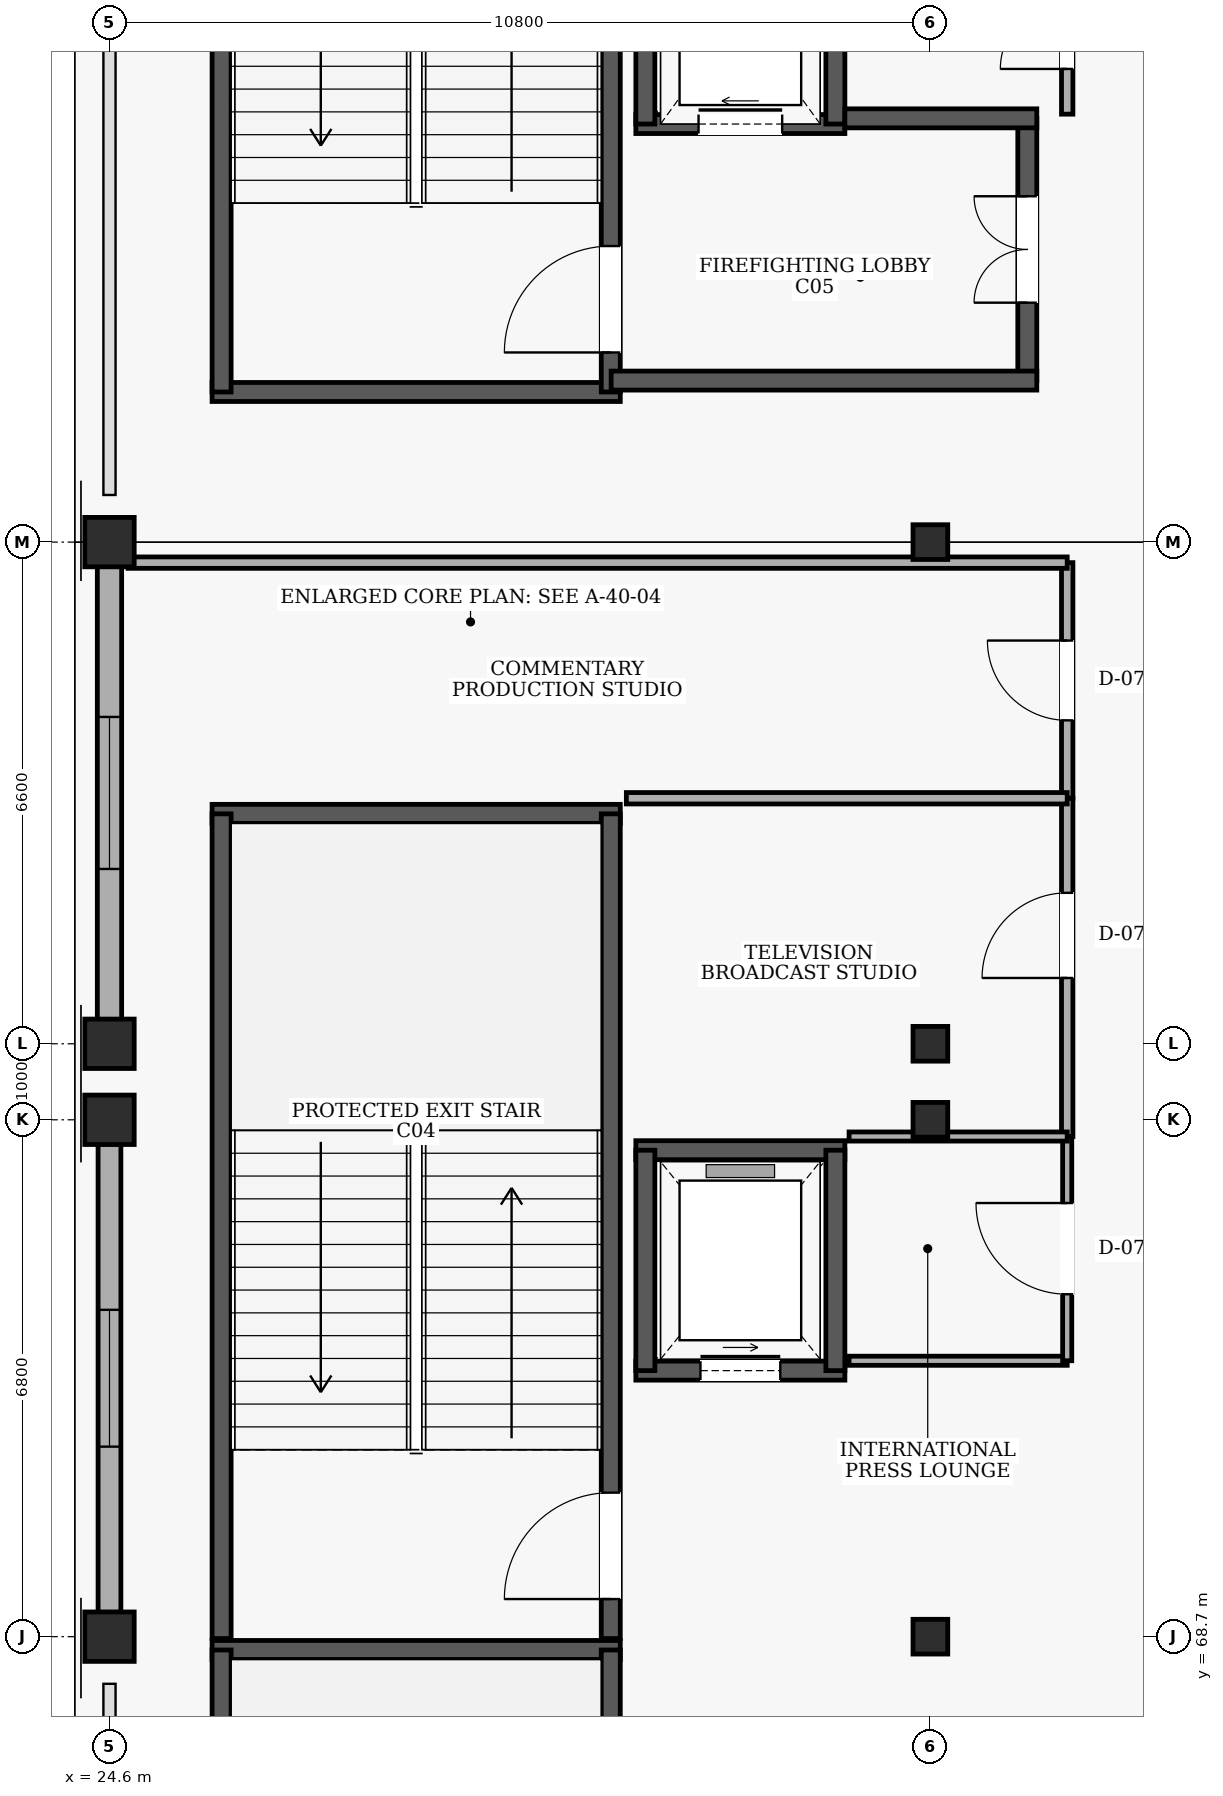
"""IFC4 building model, lengths in metres.
Left out: names, types, materials, properties, quantities, classifications, styles, units other than length and angle.
Written with IfcOpenShell. Run it as: python <this file> out.ifc"""

import sys

from ifc_helpers import new_model, si_unit, direction, frame, frame_2d, origin, origin_2d, place, context, subcontext, project, spatial, rectangle, hollow_circle, extrude, element, fill, save


model = new_model("IFC4")
c1 = context("Model", 3, precision=1e-05, world=origin(), true_north=direction((0.0, 1.0)))
c2 = subcontext(c1, "Body", "Model", "MODEL_VIEW")
j1 = project(units=[si_unit("LENGTHUNIT", "METRE"), si_unit("PLANEANGLEUNIT", "RADIAN")], contexts=[c1])
p1 = place(None, origin())
s1 = spatial("IfcSite", under=j1, at=p1, CompositionType="ELEMENT")
p2 = place(p1, origin())
s2 = spatial("IfcBuilding", under=s1, at=p2, CompositionType="ELEMENT")
p3 = place(p2, frame((0.0, 0.0, 19.8)))
s3 = spatial("IfcBuildingStorey", under=s2, at=p3, CompositionType="ELEMENT", Elevation=19.8)
for number, where, z_axis, x_axis in (
    (1, (24.6, 68.7, 0.0), (0.0, 0.0, 1.0), (1.0, 0.0, 0.0)),
    (2, (24.6, 75.5, 0.0), (0.0, 0.0, 1.0), (1.0, 0.0, 0.0)),
    (3, (24.6, 76.5, 0.0), (0.0, 0.0, 1.0), (1.0, 0.0, 0.0)),
    (4, (24.6, 83.1, 0.0), (0.0, 0.0, 1.0), (1.0, 0.0, 0.0)),
):
    element("IfcColumn", number, at=place(p3, frame(where, z_axis=z_axis, x_axis=x_axis)), inside=s3, PredefinedType="COLUMN", context=c2, shape_type="SweptSolid", body=[
        extrude(rectangle(XDim=0.65, YDim=0.65, at=origin_2d()), origin(), (0.0, 0.0, 1.0), 4.8),
    ])
for number, where, z_axis, x_axis in (
    (5, (35.4, 68.7, 0.0), (0.0, 0.0, 1.0), (1.0, 0.0, 0.0)),
    (6, (35.4, 75.5, 0.0), (0.0, 0.0, 1.0), (1.0, 0.0, 0.0)),
    (7, (35.4, 76.5, 0.0), (0.0, 0.0, 1.0), (1.0, 0.0, 0.0)),
    (8, (35.4, 83.1, 0.0), (0.0, 0.0, 1.0), (1.0, 0.0, 0.0)),
):
    element("IfcColumn", number, at=place(p3, frame(where, z_axis=z_axis, x_axis=x_axis)), inside=s3, PredefinedType="COLUMN", context=c2, shape_type="SweptSolid", body=[
        extrude(hollow_circle(Radius=0.229, WallThickness=0.02, at=origin_2d()), origin(), (0.0, 0.0, 1.0), 4.8),
    ])
p4 = place(p3, frame((24.6, 69.02, 0.0), z_axis=(0.0, 0.0, 1.0), x_axis=(0.0, 1.0, 0.0)))
e9 = element("IfcWall", 9, at=p4, inside=s3, PredefinedType="SOLIDWALL", context=c2, shape_type="SweptSolid", body=[
    extrude(rectangle(XDim=6.16, YDim=0.3, at=frame_2d((3.08, 0.0))), origin(), (0.0, 0.0, 1.0), 3.88),
])
p5 = place(p4, frame((2.18, 0.0, 0.9)))
e10 = element("IfcOpeningElement", 10, at=p5, cuts=e9, PredefinedType="OPENING", context=c2, shape_type="SweptSolid", body=[
    extrude(rectangle(XDim=1.8, YDim=1.5, at=frame_2d((0.9, 0.75))), frame((0.0, 0.16, 0.0), z_axis=(0.0, -1.0, 0.0), x_axis=(1.0, 0.0, 0.0)), (0.0, 0.0, 1.0), 0.32),
])
p6 = place(p3, frame((24.6, 76.82, 0.0), z_axis=(0.0, 0.0, 1.0), x_axis=(0.0, 1.0, 0.0)))
e11 = element("IfcWall", 11, at=p6, inside=s3, PredefinedType="SOLIDWALL", context=c2, shape_type="SweptSolid", body=[
    extrude(rectangle(XDim=5.96, YDim=0.32, at=frame_2d((2.98, 0.0))), origin(), (0.0, 0.0, 1.0), 3.98),
])
p7 = place(p6, frame((1.98, 0.0, 0.9)))
e12 = element("IfcOpeningElement", 12, at=p7, cuts=e11, PredefinedType="OPENING", context=c2, shape_type="SweptSolid", body=[
    extrude(rectangle(XDim=2.0, YDim=1.5, at=frame_2d((1.0, 0.75))), frame((0.0, 0.17, 0.0), z_axis=(0.0, -1.0, 0.0), x_axis=(1.0, 0.0, 0.0)), (0.0, 0.0, 1.0), 0.34),
])
p8 = place(p3, frame((31.32, 68.525, 0.0), z_axis=(0.0, 0.0, 1.0), x_axis=(-1.0, 0.0, 0.0)))
e13 = element("IfcWall", 13, at=p8, inside=s3, PredefinedType="SHEAR", context=c2, shape_type="SweptSolid", body=[
    extrude(rectangle(XDim=5.37, YDim=0.25, at=frame_2d((2.685, 0.0))), origin(), (0.0, 0.0, 1.0), 4.5),
])
p9 = place(p3, frame((26.075, 57.675, 0.0), z_axis=(0.0, 0.0, 1.0), x_axis=(0.0, 1.0, 0.0)))
e14 = element("IfcWall", 14, at=p9, inside=s3, PredefinedType="SHEAR", context=c2, shape_type="SweptSolid", body=[
    extrude(rectangle(XDim=10.85, YDim=0.25, at=frame_2d((5.425, 0.0))), origin(), (0.0, 0.0, 1.0), 4.5),
])
p10 = place(p3, frame((31.195, 57.675, 0.0), z_axis=(0.0, 0.0, 1.0), x_axis=(0.0, 1.0, 0.0)))
e15 = element("IfcWall", 15, at=p10, inside=s3, PredefinedType="SHEAR", context=c2, shape_type="SweptSolid", body=[
    extrude(rectangle(XDim=10.85, YDim=0.25, at=frame_2d((5.425, 0.0))), origin(), (0.0, 0.0, 1.0), 4.5),
])
p11 = place(p10, frame((0.52, 0.0, 0.0)))
e16 = element("IfcOpeningElement", 16, at=p11, cuts=e15, PredefinedType="OPENING", context=c2, shape_type="SweptSolid", body=[
    extrude(rectangle(XDim=1.4, YDim=2.15, at=frame_2d((0.7, 1.075))), frame((0.0, 0.135, 0.0), z_axis=(0.0, -1.0, 0.0), x_axis=(1.0, 0.0, 0.0)), (0.0, 0.0, 1.0), 0.27),
])
p12 = place(p3, frame((31.32, 79.525, 0.0), z_axis=(0.0, 0.0, 1.0), x_axis=(-1.0, 0.0, 0.0)))
e17 = element("IfcWall", 17, at=p12, inside=s3, PredefinedType="SHEAR", context=c2, shape_type="SweptSolid", body=[
    extrude(rectangle(XDim=5.37, YDim=0.25, at=frame_2d((2.685, 0.0))), origin(), (0.0, 0.0, 1.0), 4.5),
])
p13 = place(p3, frame((26.075, 68.675, 0.0), z_axis=(0.0, 0.0, 1.0), x_axis=(0.0, 1.0, 0.0)))
e18 = element("IfcWall", 18, at=p13, inside=s3, PredefinedType="SHEAR", context=c2, shape_type="SweptSolid", body=[
    extrude(rectangle(XDim=10.85, YDim=0.25, at=frame_2d((5.425, 0.0))), origin(), (0.0, 0.0, 1.0), 4.5),
])
p14 = place(p3, frame((31.195, 68.675, 0.0), z_axis=(0.0, 0.0, 1.0), x_axis=(0.0, 1.0, 0.0)))
e19 = element("IfcWall", 19, at=p14, inside=s3, PredefinedType="SHEAR", context=c2, shape_type="SweptSolid", body=[
    extrude(rectangle(XDim=10.85, YDim=0.25, at=frame_2d((5.425, 0.0))), origin(), (0.0, 0.0, 1.0), 4.5),
])
p15 = place(p14, frame((0.52, 0.0, 0.0)))
e20 = element("IfcOpeningElement", 20, at=p15, cuts=e19, PredefinedType="OPENING", context=c2, shape_type="SweptSolid", body=[
    extrude(rectangle(XDim=1.4, YDim=2.15, at=frame_2d((0.7, 1.075))), frame((0.0, 0.135, 0.0), z_axis=(0.0, -1.0, 0.0), x_axis=(1.0, 0.0, 0.0)), (0.0, 0.0, 1.0), 0.27),
])
p16 = place(p3, frame((25.95, 85.075, 0.0), z_axis=(0.0, 0.0, 1.0), x_axis=(1.0, 0.0, 0.0)))
e21 = element("IfcWall", 21, at=p16, inside=s3, PredefinedType="SHEAR", context=c2, shape_type="SweptSolid", body=[
    extrude(rectangle(XDim=5.37, YDim=0.25, at=frame_2d((2.685, 0.0))), origin(), (0.0, 0.0, 1.0), 4.5),
])
p17 = place(p3, frame((26.075, 85.075, 0.0), z_axis=(0.0, 0.0, 1.0), x_axis=(0.0, 1.0, 0.0)))
e22 = element("IfcWall", 22, at=p17, inside=s3, PredefinedType="SHEAR", context=c2, shape_type="SweptSolid", body=[
    extrude(rectangle(XDim=10.85, YDim=0.25, at=frame_2d((5.425, 0.0))), origin(), (0.0, 0.0, 1.0), 4.5),
])
p18 = place(p3, frame((31.195, 85.075, 0.0), z_axis=(0.0, 0.0, 1.0), x_axis=(0.0, 1.0, 0.0)))
e23 = element("IfcWall", 23, at=p18, inside=s3, PredefinedType="SHEAR", context=c2, shape_type="SweptSolid", body=[
    extrude(rectangle(XDim=10.85, YDim=0.25, at=frame_2d((5.425, 0.0))), origin(), (0.0, 0.0, 1.0), 4.5),
])
p19 = place(p18, frame((0.52, 0.0, 0.0)))
e24 = element("IfcOpeningElement", 24, at=p19, cuts=e23, PredefinedType="OPENING", context=c2, shape_type="SweptSolid", body=[
    extrude(rectangle(XDim=1.4, YDim=2.15, at=frame_2d((0.7, 1.075))), frame((0.0, 0.135, 0.0), z_axis=(0.0, -1.0, 0.0), x_axis=(1.0, 0.0, 0.0)), (0.0, 0.0, 1.0), 0.27),
])
p20 = place(p3, frame((31.525, 72.2, 0.0), z_axis=(0.0, 0.0, 1.0), x_axis=(1.0, 0.0, 0.0)))
e25 = element("IfcWall", 25, at=p20, inside=s3, PredefinedType="SHEAR", context=c2, shape_type="SweptSolid", body=[
    extrude(rectangle(XDim=2.75, YDim=0.25, at=frame_2d((1.375, 0.0))), origin(), (0.0, 0.0, 1.0), 4.5),
])
p21 = place(p20, frame((0.85, 0.0, 0.0)))
e26 = element("IfcOpeningElement", 26, at=p21, cuts=e25, PredefinedType="OPENING", context=c2, shape_type="SweptSolid", body=[
    extrude(rectangle(XDim=1.05, YDim=2.15, at=frame_2d((0.525, 1.075))), frame((0.0, 0.135, 0.0), z_axis=(0.0, -1.0, 0.0), x_axis=(1.0, 0.0, 0.0)), (0.0, 0.0, 1.0), 0.27),
])
p22 = place(p3, frame((34.275, 75.1, 0.0), z_axis=(0.0, 0.0, 1.0), x_axis=(-1.0, 0.0, 0.0)))
e27 = element("IfcWall", 27, at=p22, inside=s3, PredefinedType="SHEAR", context=c2, shape_type="SweptSolid", body=[
    extrude(rectangle(XDim=2.75, YDim=0.25, at=frame_2d((1.375, 0.0))), origin(), (0.0, 0.0, 1.0), 4.5),
])
for number, where, z_axis, x_axis in (
    (28, (31.65, 75.1, 0.0), (0.0, 0.0, 1.0), (0.0, -1.0, 0.0)),
    (29, (34.15, 72.2, 0.0), (0.0, 0.0, 1.0), (0.0, 1.0, 0.0)),
):
    element("IfcWall", number, at=place(p3, frame(where, z_axis=z_axis, x_axis=x_axis)), inside=s3, PredefinedType="SHEAR", context=c2, shape_type="SweptSolid", body=[
        extrude(rectangle(XDim=2.9, YDim=0.25, at=frame_2d((1.45, 0.0))), origin(), (0.0, 0.0, 1.0), 4.5),
    ])
p23 = place(p3, frame((31.525, 88.6, 0.0), z_axis=(0.0, 0.0, 1.0), x_axis=(1.0, 0.0, 0.0)))
e30 = element("IfcWall", 30, at=p23, inside=s3, PredefinedType="SHEAR", context=c2, shape_type="SweptSolid", body=[
    extrude(rectangle(XDim=2.75, YDim=0.25, at=frame_2d((1.375, 0.0))), origin(), (0.0, 0.0, 1.0), 4.5),
])
p24 = place(p23, frame((0.825, 0.0, 0.0)))
e31 = element("IfcOpeningElement", 31, at=p24, cuts=e30, PredefinedType="OPENING", context=c2, shape_type="SweptSolid", body=[
    extrude(rectangle(XDim=1.1, YDim=2.15, at=frame_2d((0.55, 1.075))), frame((0.0, 0.135, 0.0), z_axis=(0.0, -1.0, 0.0), x_axis=(1.0, 0.0, 0.0)), (0.0, 0.0, 1.0), 0.27),
])
for number, where, z_axis, x_axis in (
    (32, (31.65, 91.5, 0.0), (0.0, 0.0, 1.0), (0.0, -1.0, 0.0)),
    (33, (34.15, 88.6, 0.0), (0.0, 0.0, 1.0), (0.0, 1.0, 0.0)),
):
    element("IfcWall", number, at=place(p3, frame(where, z_axis=z_axis, x_axis=x_axis)), inside=s3, PredefinedType="SHEAR", context=c2, shape_type="SweptSolid", body=[
        extrude(rectangle(XDim=2.9, YDim=0.25, at=frame_2d((1.45, 0.0))), origin(), (0.0, 0.0, 1.0), 4.5),
    ])
p25 = place(p3, frame((36.675, 85.225, 0.0), z_axis=(0.0, 0.0, 1.0), x_axis=(0.0, 1.0, 0.0)))
e34 = element("IfcWall", 34, at=p25, inside=s3, PredefinedType="SHEAR", context=c2, shape_type="SweptSolid", body=[
    extrude(rectangle(XDim=3.45, YDim=0.25, at=frame_2d((1.725, 0.0))), origin(), (0.0, 0.0, 1.0), 4.5),
])
p26 = place(p25, frame((1.025, 0.0, 0.0)))
e35 = element("IfcOpeningElement", 35, at=p26, cuts=e34, PredefinedType="OPENING", context=c2, shape_type="SweptSolid", body=[
    extrude(rectangle(XDim=1.4, YDim=2.15, at=frame_2d((0.7, 1.075))), frame((0.0, 0.135, 0.0), z_axis=(0.0, -1.0, 0.0), x_axis=(1.0, 0.0, 0.0)), (0.0, 0.0, 1.0), 0.27),
])
p27 = place(p3, frame((34.275, 88.675, 0.0), z_axis=(0.0, 0.0, 1.0), x_axis=(1.0, 0.0, 0.0)))
e36 = element("IfcWall", 36, at=p27, inside=s3, PredefinedType="SHEAR", context=c2, shape_type="SweptSolid", body=[
    extrude(rectangle(XDim=2.525, YDim=0.25, at=frame_2d((1.263, 0.0))), origin(), (0.0, 0.0, 1.0), 4.5),
])
p28 = place(p3, frame((31.2, 85.225, 0.0), z_axis=(0.0, 0.0, 1.0), x_axis=(1.0, 0.0, 0.0)))
e37 = element("IfcWall", 37, at=p28, inside=s3, PredefinedType="SHEAR", context=c2, shape_type="SweptSolid", body=[
    extrude(rectangle(XDim=5.6, YDim=0.25, at=frame_2d((2.8, 0.0))), origin(), (0.0, 0.0, 1.0), 4.5),
])
p29 = place(p3, frame((37.2, 79.73, 0.0), z_axis=(0.0, 0.0, 1.0), x_axis=(0.0, 1.0, 0.0)))
e38 = element("IfcWall", 38, at=p29, inside=s3, PredefinedType="PARTITIONING", context=c2, shape_type="SweptSolid", body=[
    extrude(rectangle(XDim=3.1, YDim=0.15, at=frame_2d((1.55, 0.0))), origin(), (0.0, 0.0, 1.0), 4.5),
])
p30 = place(p29, frame((1.025, 0.0, 0.0)))
e39 = element("IfcOpeningElement", 39, at=p30, cuts=e38, PredefinedType="OPENING", context=c2, shape_type="SweptSolid", body=[
    extrude(rectangle(XDim=1.05, YDim=2.15, at=frame_2d((0.525, 1.075))), frame((0.0, 0.085, 0.0), z_axis=(0.0, -1.0, 0.0), x_axis=(1.0, 0.0, 0.0)), (0.0, 0.0, 1.0), 0.17),
])
p31 = place(p3, frame((37.2, 82.83, 0.0), z_axis=(0.0, 0.0, 1.0), x_axis=(-1.0, 0.0, 0.0)))
e40 = element("IfcWall", 40, at=p31, inside=s3, PredefinedType="PARTITIONING", context=c2, shape_type="SweptSolid", body=[
    extrude(rectangle(XDim=12.355, YDim=0.15, at=frame_2d((6.177, 0.0))), origin(), (0.0, 0.0, 1.0), 3.58),
])
p32 = place(p3, frame((37.2, 75.28, 0.0), z_axis=(0.0, 0.0, 1.0), x_axis=(0.0, 1.0, 0.0)))
e41 = element("IfcWall", 41, at=p32, inside=s3, PredefinedType="PARTITIONING", context=c2, shape_type="SweptSolid", body=[
    extrude(rectangle(XDim=4.45, YDim=0.15, at=frame_2d((2.225, 0.0))), origin(), (0.0, 0.0, 1.0), 4.5),
])
p33 = place(p32, frame((2.086, 0.0, 0.0)))
e42 = element("IfcOpeningElement", 42, at=p33, cuts=e41, PredefinedType="OPENING", context=c2, shape_type="SweptSolid", body=[
    extrude(rectangle(XDim=1.12, YDim=2.15, at=frame_2d((0.56, 1.075))), frame((0.0, 0.085, 0.0), z_axis=(0.0, -1.0, 0.0), x_axis=(1.0, 0.0, 0.0)), (0.0, 0.0, 1.0), 0.17),
])
p34 = place(p3, frame((37.2, 79.73, 0.0), z_axis=(0.0, 0.0, 1.0), x_axis=(-1.0, 0.0, 0.0)))
e43 = element("IfcWall", 43, at=p34, inside=s3, PredefinedType="PARTITIONING", context=c2, shape_type="SweptSolid", body=[
    extrude(rectangle(XDim=5.8, YDim=0.15, at=frame_2d((2.9, 0.0))), origin(), (0.0, 0.0, 1.0), 4.5),
])
p35 = place(p3, frame((34.33, 72.33, 0.0), z_axis=(0.0, 0.0, 1.0), x_axis=(1.0, 0.0, 0.0)))
e44 = element("IfcWall", 44, at=p35, inside=s3, PredefinedType="PARTITIONING", context=c2, shape_type="SweptSolid", body=[
    extrude(rectangle(XDim=2.87, YDim=0.12, at=frame_2d((1.435, 0.0))), origin(), (0.0, 0.0, 1.0), 4.5),
])
p36 = place(p3, frame((37.2, 72.33, 0.0), z_axis=(0.0, 0.0, 1.0), x_axis=(0.0, 1.0, 0.0)))
e45 = element("IfcWall", 45, at=p36, inside=s3, PredefinedType="PARTITIONING", context=c2, shape_type="SweptSolid", body=[
    extrude(rectangle(XDim=2.95, YDim=0.12, at=frame_2d((1.475, 0.0))), origin(), (0.0, 0.0, 1.0), 4.5),
])
p37 = place(p36, frame((0.875, 0.0, 0.0)))
e46 = element("IfcOpeningElement", 46, at=p37, cuts=e45, PredefinedType="OPENING", context=c2, shape_type="SweptSolid", body=[
    extrude(rectangle(XDim=1.2, YDim=2.15, at=frame_2d((0.6, 1.075))), frame((0.0, 0.07, 0.0), z_axis=(0.0, -1.0, 0.0), x_axis=(1.0, 0.0, 0.0)), (0.0, 0.0, 1.0), 0.14),
])
p38 = place(p3, frame((37.2, 75.28, 0.0), z_axis=(0.0, 0.0, 1.0), x_axis=(-1.0, 0.0, 0.0)))
e47 = element("IfcWall", 47, at=p38, inside=s3, PredefinedType="PARTITIONING", context=c2, shape_type="SweptSolid", body=[
    extrude(rectangle(XDim=2.87, YDim=0.12, at=frame_2d((1.435, 0.0))), origin(), (0.0, 0.0, 1.0), 4.5),
])
p39 = place(p3, frame((37.2, 88.73, 0.0), z_axis=(0.0, 0.0, 1.0), x_axis=(0.0, 1.0, 0.0)))
e48 = element("IfcWall", 48, at=p39, inside=s3, PredefinedType="PARTITIONING", context=c2, shape_type="SweptSolid", body=[
    extrude(rectangle(XDim=2.95, YDim=0.15, at=frame_2d((1.475, 0.0))), origin(), (0.0, 0.0, 1.0), 4.5),
])
p40 = place(p39, frame((0.595, 0.0, 0.0)))
e49 = element("IfcOpeningElement", 49, at=p40, cuts=e48, PredefinedType="OPENING", context=c2, shape_type="SweptSolid", body=[
    extrude(rectangle(XDim=1.76, YDim=2.25, at=frame_2d((0.88, 1.125))), frame((0.0, 0.085, 0.0), z_axis=(0.0, -1.0, 0.0), x_axis=(1.0, 0.0, 0.0)), (0.0, 0.0, 1.0), 0.17),
])
p41 = place(p5, origin())
e50 = element("IfcWindow", 50, at=p41, inside=s3, PartitioningType="SINGLE_PANEL", PredefinedType="WINDOW", context=c2, shape_type="SweptSolid", body=[
    extrude(rectangle(XDim=1.8, YDim=1.5, at=frame_2d((0.9, 0.75))), frame((0.0, 0.03, 0.0), z_axis=(0.0, -1.0, 0.0), x_axis=(1.0, 0.0, 0.0)), (0.0, 0.0, 1.0), 0.06),
])
fill(e10, e50)
p42 = place(p7, origin())
e51 = element("IfcWindow", 51, at=p42, inside=s3, PartitioningType="SINGLE_PANEL", PredefinedType="WINDOW", context=c2, shape_type="SweptSolid", body=[
    extrude(rectangle(XDim=2.0, YDim=1.5, at=frame_2d((1.0, 0.75))), frame((0.0, 0.03, 0.0), z_axis=(0.0, -1.0, 0.0), x_axis=(1.0, 0.0, 0.0)), (0.0, 0.0, 1.0), 0.06),
])
fill(e12, e51)
p43 = place(p15, origin())
e52 = element("IfcDoor", 52, at=p43, inside=s3, OperationType="SINGLE_SWING_LEFT", PredefinedType="DOOR", context=c2, shape_type="SweptSolid", body=[
    extrude(rectangle(XDim=1.4, YDim=2.15, at=frame_2d((0.7, 1.075))), frame((0.0, 0.025, 0.0), z_axis=(0.0, -1.0, 0.0), x_axis=(1.0, 0.0, 0.0)), (0.0, 0.0, 1.0), 0.05),
])
fill(e20, e52)
p44 = place(p19, origin())
e53 = element("IfcDoor", 53, at=p44, inside=s3, OperationType="SINGLE_SWING_LEFT", PredefinedType="DOOR", context=c2, shape_type="SweptSolid", body=[
    extrude(rectangle(XDim=1.4, YDim=2.15, at=frame_2d((0.7, 1.075))), frame((0.0, 0.025, 0.0), z_axis=(0.0, -1.0, 0.0), x_axis=(1.0, 0.0, 0.0)), (0.0, 0.0, 1.0), 0.05),
])
fill(e24, e53)
p45 = place(p21, origin())
e54 = element("IfcDoor", 54, at=p45, inside=s3, OperationType="SLIDING_TO_LEFT", PredefinedType="DOOR", context=c2, shape_type="SweptSolid", body=[
    extrude(rectangle(XDim=1.05, YDim=2.15, at=frame_2d((0.525, 1.075))), frame((0.0, 0.025, 0.0), z_axis=(0.0, -1.0, 0.0), x_axis=(1.0, 0.0, 0.0)), (0.0, 0.0, 1.0), 0.05),
])
fill(e26, e54)
p46 = place(p24, origin())
e55 = element("IfcDoor", 55, at=p46, inside=s3, OperationType="SLIDING_TO_RIGHT", PredefinedType="DOOR", context=c2, shape_type="SweptSolid", body=[
    extrude(rectangle(XDim=1.1, YDim=2.15, at=frame_2d((0.55, 1.075))), frame((0.0, 0.025, 0.0), z_axis=(0.0, -1.0, 0.0), x_axis=(1.0, 0.0, 0.0)), (0.0, 0.0, 1.0), 0.05),
])
fill(e31, e55)
p47 = place(p26, origin())
e56 = element("IfcDoor", 56, at=p47, inside=s3, OperationType="DOUBLE_DOOR_SINGLE_SWING", PredefinedType="DOOR", context=c2, shape_type="SweptSolid", body=[
    extrude(rectangle(XDim=1.4, YDim=2.15, at=frame_2d((0.7, 1.075))), frame((0.0, 0.025, 0.0), z_axis=(0.0, -1.0, 0.0), x_axis=(1.0, 0.0, 0.0)), (0.0, 0.0, 1.0), 0.05),
])
fill(e35, e56)
p48 = place(p30, origin())
e57 = element("IfcDoor", 57, at=p48, inside=s3, OperationType="SINGLE_SWING_RIGHT", PredefinedType="DOOR", context=c2, shape_type="SweptSolid", body=[
    extrude(rectangle(XDim=1.05, YDim=2.15, at=frame_2d((0.525, 1.075))), frame((0.0, 0.025, 0.0), z_axis=(0.0, -1.0, 0.0), x_axis=(1.0, 0.0, 0.0)), (0.0, 0.0, 1.0), 0.05),
])
fill(e39, e57)
p49 = place(p33, origin())
e58 = element("IfcDoor", 58, at=p49, inside=s3, OperationType="SINGLE_SWING_LEFT", PredefinedType="DOOR", context=c2, shape_type="SweptSolid", body=[
    extrude(rectangle(XDim=1.12, YDim=2.15, at=frame_2d((0.56, 1.075))), frame((0.0, 0.025, 0.0), z_axis=(0.0, -1.0, 0.0), x_axis=(1.0, 0.0, 0.0)), (0.0, 0.0, 1.0), 0.05),
])
fill(e42, e58)
p50 = place(p37, origin())
e59 = element("IfcDoor", 59, at=p50, inside=s3, OperationType="SINGLE_SWING_RIGHT", PredefinedType="DOOR", context=c2, shape_type="SweptSolid", body=[
    extrude(rectangle(XDim=1.2, YDim=2.15, at=frame_2d((0.6, 1.075))), frame((0.0, 0.025, 0.0), z_axis=(0.0, -1.0, 0.0), x_axis=(1.0, 0.0, 0.0)), (0.0, 0.0, 1.0), 0.05),
])
fill(e46, e59)
p51 = place(p40, origin())
e60 = element("IfcDoor", 60, at=p51, inside=s3, OperationType="DOUBLE_DOOR_SINGLE_SWING", PredefinedType="DOOR", context=c2, shape_type="SweptSolid", body=[
    extrude(rectangle(XDim=1.76, YDim=2.25, at=frame_2d((0.88, 1.125))), frame((0.0, 0.025, 0.0), z_axis=(0.0, -1.0, 0.0), x_axis=(1.0, 0.0, 0.0)), (0.0, 0.0, 1.0), 0.05),
])
fill(e49, e60)
save(model, sys.argv[1])
